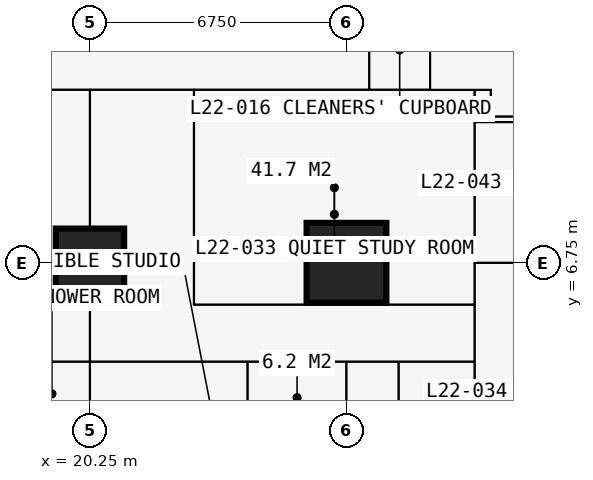
"""IFC4 building model, lengths in metres.
Left out: names, types, materials, properties, quantities, classifications, styles, units other than length and angle.
Written with IfcOpenShell. Run it as: python <this file> out.ifc"""

import sys

from ifc_helpers import new_model, si_unit, direction, frame, frame_2d, origin, origin_2d, place, context, subcontext, project, spatial, rectangle, extrude, element, fill, save


model = new_model("IFC4")
c1 = context("Model", 3, precision=1e-05, world=origin(), true_north=direction((0.0, 1.0)))
c2 = subcontext(c1, "Body", "Model", "MODEL_VIEW")
j1 = project(units=[si_unit("LENGTHUNIT", "METRE"), si_unit("PLANEANGLEUNIT", "RADIAN")], contexts=[c1])
p1 = place(None, origin())
s1 = spatial("IfcSite", under=j1, at=p1, CompositionType="ELEMENT")
p2 = place(p1, origin())
s2 = spatial("IfcBuilding", under=s1, at=p2, CompositionType="ELEMENT")
p3 = place(p2, frame((0.0, 0.0, 83.7)))
s3 = spatial("IfcBuildingStorey", under=s2, at=p3, CompositionType="ELEMENT", Elevation=83.7)
p4 = place(p3, frame((20.25, 6.75, 0.0), z_axis=(0.0, 0.0, 1.0), x_axis=(1.0, 0.0, 0.0)))
e1 = element("IfcColumn", 1, at=p4, inside=s3, PredefinedType="COLUMN", context=c2, shape_type="SweptSolid", body=[
    extrude(rectangle(XDim=1.8, YDim=1.8, at=origin_2d()), origin(), (0.0, 0.0, 1.0), 3.6),
])
p5 = place(p3, frame((27.0, 6.75, 0.0), z_axis=(0.0, 0.0, 1.0), x_axis=(1.0, 0.0, 0.0)))
e2 = element("IfcColumn", 2, at=p5, inside=s3, PredefinedType="COLUMN", context=c2, shape_type="SweptSolid", body=[
    extrude(rectangle(XDim=2.1, YDim=2.1, at=origin_2d()), origin(), (0.0, 0.0, 1.0), 3.6),
])
p6 = place(p3, frame((6.75, 4.15, 0.0), z_axis=(0.0, 0.0, 1.0), x_axis=(1.0, 0.0, 0.0)))
e3 = element("IfcWall", 3, at=p6, inside=s3, PredefinedType="PARTITIONING", context=c2, shape_type="SweptSolid", body=[
    extrude(rectangle(XDim=23.625, YDim=0.1, at=frame_2d((11.812, 0.0))), origin(), (0.0, 0.0, 1.0), 3.375),
])
p7 = place(p6, frame((0.2, 0.0, 0.0)))
e4 = element("IfcOpeningElement", 4, at=p7, cuts=e3, PredefinedType="OPENING", context=c2, shape_type="SweptSolid", body=[
    extrude(rectangle(XDim=0.95, YDim=2.2, at=frame_2d((0.475, 1.1))), frame((0.0, 0.06, 0.0), z_axis=(0.0, -1.0, 0.0), x_axis=(1.0, 0.0, 0.0)), (0.0, 0.0, 1.0), 0.12),
])
p8 = place(p6, frame((3.625, 0.0, 0.0)))
e5 = element("IfcOpeningElement", 5, at=p8, cuts=e3, PredefinedType="OPENING", context=c2, shape_type="SweptSolid", body=[
    extrude(rectangle(XDim=0.95, YDim=2.2, at=frame_2d((0.475, 1.1))), frame((0.0, 0.06, 0.0), z_axis=(0.0, -1.0, 0.0), x_axis=(1.0, 0.0, 0.0)), (0.0, 0.0, 1.0), 0.12),
])
p9 = place(p6, frame((7.0, 0.0, 0.0)))
e6 = element("IfcOpeningElement", 6, at=p9, cuts=e3, PredefinedType="OPENING", context=c2, shape_type="SweptSolid", body=[
    extrude(rectangle(XDim=0.95, YDim=2.2, at=frame_2d((0.475, 1.1))), frame((0.0, 0.06, 0.0), z_axis=(0.0, -1.0, 0.0), x_axis=(1.0, 0.0, 0.0)), (0.0, 0.0, 1.0), 0.12),
])
p10 = place(p6, frame((10.375, 0.0, 0.0)))
e7 = element("IfcOpeningElement", 7, at=p10, cuts=e3, PredefinedType="OPENING", context=c2, shape_type="SweptSolid", body=[
    extrude(rectangle(XDim=0.95, YDim=2.2, at=frame_2d((0.475, 1.1))), frame((0.0, 0.06, 0.0), z_axis=(0.0, -1.0, 0.0), x_axis=(1.0, 0.0, 0.0)), (0.0, 0.0, 1.0), 0.12),
])
p11 = place(p6, frame((15.1, 0.0, 0.0)))
e8 = element("IfcOpeningElement", 8, at=p11, cuts=e3, PredefinedType="OPENING", context=c2, shape_type="SweptSolid", body=[
    extrude(rectangle(XDim=0.95, YDim=2.2, at=frame_2d((0.475, 1.1))), frame((0.0, 0.06, 0.0), z_axis=(0.0, -1.0, 0.0), x_axis=(1.0, 0.0, 0.0)), (0.0, 0.0, 1.0), 0.12),
])
p12 = place(p6, frame((20.5, 0.0, 0.0)))
e9 = element("IfcOpeningElement", 9, at=p12, cuts=e3, PredefinedType="OPENING", context=c2, shape_type="SweptSolid", body=[
    extrude(rectangle(XDim=0.95, YDim=2.2, at=frame_2d((0.475, 1.1))), frame((0.0, 0.06, 0.0), z_axis=(0.0, -1.0, 0.0), x_axis=(1.0, 0.0, 0.0)), (0.0, 0.0, 1.0), 0.12),
])
p13 = place(p3, frame((10.125, 11.3, 0.0), z_axis=(0.0, 0.0, 1.0), x_axis=(1.0, 0.0, 0.0)))
e10 = element("IfcWall", 10, at=p13, inside=s3, PredefinedType="PARTITIONING", context=c2, shape_type="SweptSolid", body=[
    extrude(rectangle(XDim=20.675, YDim=0.15, at=frame_2d((10.337, 0.0))), origin(), (0.0, 0.0, 1.0), 3.375),
])
p14 = place(p13, frame((8.375, 0.0, 0.0)))
e11 = element("IfcOpeningElement", 11, at=p14, cuts=e10, PredefinedType="OPENING", context=c2, shape_type="SweptSolid", body=[
    extrude(rectangle(XDim=1.0, YDim=2.2, at=frame_2d((0.5, 1.1))), frame((0.0, 0.085, 0.0), z_axis=(0.0, -1.0, 0.0), x_axis=(1.0, 0.0, 0.0)), (0.0, 0.0, 1.0), 0.17),
])
p15 = place(p13, frame((10.975, 0.0, 0.0)))
e12 = element("IfcOpeningElement", 12, at=p15, cuts=e10, PredefinedType="OPENING", context=c2, shape_type="SweptSolid", body=[
    extrude(rectangle(XDim=1.0, YDim=2.2, at=frame_2d((0.5, 1.1))), frame((0.0, 0.085, 0.0), z_axis=(0.0, -1.0, 0.0), x_axis=(1.0, 0.0, 0.0)), (0.0, 0.0, 1.0), 0.17),
])
p16 = place(p13, frame((3.925, 0.0, 0.0)))
e13 = element("IfcOpeningElement", 13, at=p16, cuts=e10, PredefinedType="OPENING", context=c2, shape_type="SweptSolid", body=[
    extrude(rectangle(XDim=0.95, YDim=2.2, at=frame_2d((0.475, 1.1))), frame((0.0, 0.085, 0.0), z_axis=(0.0, -1.0, 0.0), x_axis=(1.0, 0.0, 0.0)), (0.0, 0.0, 1.0), 0.17),
])
p17 = place(p3, frame((20.25, -0.734, 0.0), z_axis=(0.0, 0.0, 1.0), x_axis=(0.0, 1.0, 0.0)))
e14 = element("IfcWall", 14, at=p17, inside=s3, PredefinedType="PARTITIONING", context=c2, shape_type="SweptSolid", body=[
    extrude(rectangle(XDim=12.034, YDim=0.15, at=frame_2d((6.017, 0.0))), origin(), (0.0, 0.0, 1.0), 2.61),
])
p18 = place(p3, frame((22.988, 5.65, 0.0), z_axis=(0.0, 0.0, 1.0), x_axis=(1.0, 0.0, 0.0)))
e15 = element("IfcWall", 15, at=p18, inside=s3, PredefinedType="PARTITIONING", context=c2, shape_type="SweptSolid", body=[
    extrude(rectangle(XDim=7.387, YDim=0.15, at=frame_2d((3.694, 0.0))), origin(), (0.0, 0.0, 1.0), 3.375),
])
p19 = place(p18, frame((2.0, 0.0, 0.0)))
e16 = element("IfcOpeningElement", 16, at=p19, cuts=e15, PredefinedType="OPENING", context=c2, shape_type="SweptSolid", body=[
    extrude(rectangle(XDim=0.95, YDim=2.2, at=frame_2d((0.475, 1.1))), frame((0.0, 0.085, 0.0), z_axis=(0.0, -1.0, 0.0), x_axis=(1.0, 0.0, 0.0)), (0.0, 0.0, 1.0), 0.17),
])
p20 = place(p3, frame((22.988, 5.65, 0.0), z_axis=(0.0, 0.0, 1.0), x_axis=(0.0, 1.0, 0.0)))
e17 = element("IfcWall", 17, at=p20, inside=s3, PredefinedType="PARTITIONING", context=c2, shape_type="SweptSolid", body=[
    extrude(rectangle(XDim=5.65, YDim=0.15, at=frame_2d((2.825, 0.0))), origin(), (0.0, 0.0, 1.0), 3.375),
])
p21 = place(p3, frame((24.4, 1.75, 0.0), z_axis=(0.0, 0.0, 1.0), x_axis=(0.0, 1.0, 0.0)))
e18 = element("IfcWall", 18, at=p21, inside=s3, PredefinedType="PARTITIONING", context=c2, shape_type="SweptSolid", body=[
    extrude(rectangle(XDim=2.4, YDim=0.1, at=frame_2d((1.2, 0.0))), origin(), (0.0, 0.0, 1.0), 3.375),
])
p22 = place(p3, frame((27.0, -0.734, 0.0), z_axis=(0.0, 0.0, 1.0), x_axis=(0.0, 1.0, 0.0)))
e19 = element("IfcWall", 19, at=p22, inside=s3, PredefinedType="PARTITIONING", context=c2, shape_type="SweptSolid", body=[
    extrude(rectangle(XDim=4.884, YDim=0.175, at=frame_2d((2.442, 0.0))), origin(), (0.0, 0.0, 1.0), 2.877),
])
p23 = place(p3, frame((27.6, 11.3, 0.0), z_axis=(0.0, 0.0, 1.0), x_axis=(0.0, 1.0, 0.0)))
e20 = element("IfcWall", 20, at=p23, inside=s3, PredefinedType="PARTITIONING", context=c2, shape_type="SweptSolid", body=[
    extrude(rectangle(XDim=1.6, YDim=0.15, at=frame_2d((0.8, 0.0))), origin(), (0.0, 0.0, 1.0), 3.375),
])
p24 = place(p23, frame((0.3, 0.0, 0.0)))
e21 = element("IfcOpeningElement", 21, at=p24, cuts=e20, PredefinedType="OPENING", context=c2, shape_type="SweptSolid", body=[
    extrude(rectangle(XDim=0.95, YDim=2.2, at=frame_2d((0.475, 1.1))), frame((0.0, 0.085, 0.0), z_axis=(0.0, -1.0, 0.0), x_axis=(1.0, 0.0, 0.0)), (0.0, 0.0, 1.0), 0.17),
])
p25 = place(p3, frame((28.375, 1.95, 0.0), z_axis=(0.0, 0.0, 1.0), x_axis=(0.0, 1.0, 0.0)))
e22 = element("IfcWall", 22, at=p25, inside=s3, PredefinedType="PARTITIONING", context=c2, shape_type="SweptSolid", body=[
    extrude(rectangle(XDim=2.2, YDim=0.1, at=frame_2d((1.1, 0.0))), origin(), (0.0, 0.0, 1.0), 3.375),
])
p26 = place(p25, frame((0.65, 0.0, 0.0)))
e23 = element("IfcOpeningElement", 23, at=p26, cuts=e22, PredefinedType="OPENING", context=c2, shape_type="SweptSolid", body=[
    extrude(rectangle(XDim=0.9, YDim=2.2, at=frame_2d((0.45, 1.1))), frame((0.0, 0.06, 0.0), z_axis=(0.0, -1.0, 0.0), x_axis=(1.0, 0.0, 0.0)), (0.0, 0.0, 1.0), 0.12),
])
p27 = place(p3, frame((29.2, 11.3, 0.0), z_axis=(0.0, 0.0, 1.0), x_axis=(0.0, 1.0, 0.0)))
e24 = element("IfcWall", 24, at=p27, inside=s3, PredefinedType="PARTITIONING", context=c2, shape_type="SweptSolid", body=[
    extrude(rectangle(XDim=17.9, YDim=0.2, at=frame_2d((8.95, 0.0))), origin(), (0.0, 0.0, 1.0), 3.375),
])
p28 = place(p27, frame((8.35, 0.0, 0.0)))
e25 = element("IfcOpeningElement", 25, at=p28, cuts=e24, PredefinedType="OPENING", context=c2, shape_type="SweptSolid", body=[
    extrude(rectangle(XDim=1.2, YDim=2.2, at=frame_2d((0.6, 1.1))), frame((0.0, 0.11, 0.0), z_axis=(0.0, -1.0, 0.0), x_axis=(1.0, 0.0, 0.0)), (0.0, 0.0, 1.0), 0.22),
])
p29 = place(p3, frame((30.375, -0.734, 0.0), z_axis=(0.0, 0.0, 1.0), x_axis=(0.0, 1.0, 0.0)))
e26 = element("IfcWall", 26, at=p29, inside=s3, PredefinedType="PARTITIONING", context=c2, shape_type="SweptSolid", body=[
    extrude(rectangle(XDim=12.034, YDim=0.15, at=frame_2d((6.017, 0.0))), origin(), (0.0, 0.0, 1.0), 3.375),
])
p30 = place(p29, frame((5.134, 0.0, 0.0)))
e27 = element("IfcOpeningElement", 27, at=p30, cuts=e26, PredefinedType="OPENING", context=c2, shape_type="SweptSolid", body=[
    extrude(rectangle(XDim=1.0, YDim=2.2, at=frame_2d((0.5, 1.1))), frame((0.0, 0.085, 0.0), z_axis=(0.0, -1.0, 0.0), x_axis=(1.0, 0.0, 0.0)), (0.0, 0.0, 1.0), 0.17),
])
p31 = place(p3, frame((30.375, 6.75, 0.0), z_axis=(0.0, 0.0, 1.0), x_axis=(1.0, 0.0, 0.0)))
e28 = element("IfcWall", 28, at=p31, inside=s3, PredefinedType="PARTITIONING", context=c2, shape_type="SweptSolid", body=[
    extrude(rectangle(XDim=5.975, YDim=0.15, at=frame_2d((2.988, 0.0))), origin(), (0.0, 0.0, 1.0), 2.877),
])
p32 = place(p3, frame((30.375, 10.45, 0.0), z_axis=(0.0, 0.0, 1.0), x_axis=(1.0, 0.0, 0.0)))
e29 = element("IfcWall", 29, at=p32, inside=s3, PredefinedType="PARTITIONING", context=c2, shape_type="SweptSolid", body=[
    extrude(rectangle(XDim=4.475, YDim=0.15, at=frame_2d((2.238, 0.0))), origin(), (0.0, 0.0, 1.0), 3.375),
])
p33 = place(p32, frame((2.35, 0.0, 0.0)))
e30 = element("IfcOpeningElement", 30, at=p33, cuts=e29, PredefinedType="OPENING", context=c2, shape_type="SweptSolid", body=[
    extrude(rectangle(XDim=0.95, YDim=2.2, at=frame_2d((0.475, 1.1))), frame((0.0, 0.085, 0.0), z_axis=(0.0, -1.0, 0.0), x_axis=(1.0, 0.0, 0.0)), (0.0, 0.0, 1.0), 0.17),
])
p34 = place(p3, frame((30.8, 10.6, 0.0), z_axis=(0.0, 0.0, 1.0), x_axis=(0.0, 1.0, 0.0)))
e31 = element("IfcWall", 31, at=p34, inside=s3, PredefinedType="PARTITIONING", context=c2, shape_type="SweptSolid", body=[
    extrude(rectangle(XDim=0.7, YDim=0.15, at=frame_2d((0.35, 0.0))), origin(), (0.0, 0.0, 1.0), 3.375),
])
p35 = place(p3, frame((30.8, 10.6, 0.0), z_axis=(0.0, 0.0, 1.0), x_axis=(1.0, 0.0, 0.0)))
e32 = element("IfcWall", 32, at=p35, inside=s3, PredefinedType="PARTITIONING", context=c2, shape_type="SweptSolid", body=[
    extrude(rectangle(XDim=1.85, YDim=0.15, at=frame_2d((0.925, 0.0))), origin(), (0.0, 0.0, 1.0), 3.375),
])
p36 = place(p24, origin())
e33 = element("IfcDoor", 33, at=p36, inside=s3, OperationType="SINGLE_SWING_LEFT", PredefinedType="DOOR", context=c2, shape_type="SweptSolid", body=[
    extrude(rectangle(XDim=0.95, YDim=2.2, at=frame_2d((0.475, 1.1))), frame((0.0, 0.025, 0.0), z_axis=(0.0, -1.0, 0.0), x_axis=(1.0, 0.0, 0.0)), (0.0, 0.0, 1.0), 0.05),
])
fill(e21, e33)
p37 = place(p14, origin())
e34 = element("IfcDoor", 34, at=p37, inside=s3, OperationType="SINGLE_SWING_LEFT", PredefinedType="DOOR", context=c2, shape_type="SweptSolid", body=[
    extrude(rectangle(XDim=1.0, YDim=2.2, at=frame_2d((0.5, 1.1))), frame((0.0, 0.025, 0.0), z_axis=(0.0, -1.0, 0.0), x_axis=(1.0, 0.0, 0.0)), (0.0, 0.0, 1.0), 0.05),
])
fill(e11, e34)
p38 = place(p11, origin())
e35 = element("IfcDoor", 35, at=p38, inside=s3, OperationType="SINGLE_SWING_LEFT", PredefinedType="DOOR", context=c2, shape_type="SweptSolid", body=[
    extrude(rectangle(XDim=0.95, YDim=2.2, at=frame_2d((0.475, 1.1))), frame((0.0, 0.025, 0.0), z_axis=(0.0, -1.0, 0.0), x_axis=(1.0, 0.0, 0.0)), (0.0, 0.0, 1.0), 0.05),
])
fill(e8, e35)
p39 = place(p12, origin())
e36 = element("IfcDoor", 36, at=p39, inside=s3, OperationType="SINGLE_SWING_LEFT", PredefinedType="DOOR", context=c2, shape_type="SweptSolid", body=[
    extrude(rectangle(XDim=0.95, YDim=2.2, at=frame_2d((0.475, 1.1))), frame((0.0, 0.025, 0.0), z_axis=(0.0, -1.0, 0.0), x_axis=(1.0, 0.0, 0.0)), (0.0, 0.0, 1.0), 0.05),
])
fill(e9, e36)
p40 = place(p26, origin())
e37 = element("IfcDoor", 37, at=p40, inside=s3, OperationType="SINGLE_SWING_RIGHT", PredefinedType="DOOR", context=c2, shape_type="SweptSolid", body=[
    extrude(rectangle(XDim=0.9, YDim=2.2, at=frame_2d((0.45, 1.1))), frame((0.0, 0.025, 0.0), z_axis=(0.0, -1.0, 0.0), x_axis=(1.0, 0.0, 0.0)), (0.0, 0.0, 1.0), 0.05),
])
fill(e23, e37)
p41 = place(p15, origin())
e38 = element("IfcDoor", 38, at=p41, inside=s3, OperationType="SINGLE_SWING_LEFT", PredefinedType="DOOR", context=c2, shape_type="SweptSolid", body=[
    extrude(rectangle(XDim=1.0, YDim=2.2, at=frame_2d((0.5, 1.1))), frame((0.0, 0.025, 0.0), z_axis=(0.0, -1.0, 0.0), x_axis=(1.0, 0.0, 0.0)), (0.0, 0.0, 1.0), 0.05),
])
fill(e12, e38)
p42 = place(p19, origin())
e39 = element("IfcDoor", 39, at=p42, inside=s3, OperationType="SINGLE_SWING_LEFT", PredefinedType="DOOR", context=c2, shape_type="SweptSolid", body=[
    extrude(rectangle(XDim=0.95, YDim=2.2, at=frame_2d((0.475, 1.1))), frame((0.0, 0.025, 0.0), z_axis=(0.0, -1.0, 0.0), x_axis=(1.0, 0.0, 0.0)), (0.0, 0.0, 1.0), 0.05),
])
fill(e16, e39)
p43 = place(p30, origin())
e40 = element("IfcDoor", 40, at=p43, inside=s3, OperationType="SINGLE_SWING_LEFT", PredefinedType="DOOR", context=c2, shape_type="SweptSolid", body=[
    extrude(rectangle(XDim=1.0, YDim=2.2, at=frame_2d((0.5, 1.1))), frame((0.0, 0.025, 0.0), z_axis=(0.0, -1.0, 0.0), x_axis=(1.0, 0.0, 0.0)), (0.0, 0.0, 1.0), 0.05),
])
fill(e27, e40)
save(model, sys.argv[1])
